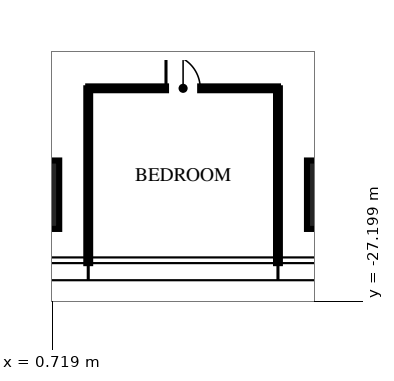
"""IFC4 building model, lengths in metres.
Left out: names, types, materials, properties, quantities, classifications, styles, units other than length and angle.
Written with IfcOpenShell. Run it as: python <this file> out.ifc"""

import sys

from ifc_helpers import new_model, si_unit, direction, frame, frame_2d, origin, origin_2d, place, context, subcontext, project, spatial, rectangle, extrude, element, fill, save


model = new_model("IFC4")
c1 = context("Model", 3, precision=1e-05, world=origin(), true_north=direction((0.0, 1.0)))
c2 = subcontext(c1, "Body", "Model", "MODEL_VIEW")
j1 = project(units=[si_unit("LENGTHUNIT", "METRE"), si_unit("PLANEANGLEUNIT", "RADIAN")], contexts=[c1])
p1 = place(None, origin())
s1 = spatial("IfcSite", under=j1, at=p1, CompositionType="ELEMENT")
p2 = place(p1, origin())
s2 = spatial("IfcBuilding", under=s1, at=p2, CompositionType="ELEMENT")
p3 = place(p2, frame((0.0, 0.0, 222.0)))
s3 = spatial("IfcBuildingStorey", under=s2, at=p3, CompositionType="ELEMENT", Elevation=222.0)
for number, where, z_axis, x_axis in (
    (1, (8.32, -24.4, 0.0), (0.0, 0.0, 1.0), (1.0, 0.0, 0.0)),
    (2, (0.0, -24.4, 0.0), (0.0, 0.0, 1.0), (1.0, 0.0, 0.0)),
):
    element("IfcColumn", number, at=place(p3, frame(where, z_axis=z_axis, x_axis=x_axis)), inside=s3, PredefinedType="COLUMN", context=c2, shape_type="SweptSolid", body=[
        extrude(rectangle(XDim=1.8, YDim=1.8, at=origin_2d()), origin(), (0.0, 0.0, 1.0), 3.75),
    ])
for number, where, z_axis, x_axis in (
    (3, (1.664, -21.6, 0.0), (0.0, 0.0, 1.0), (0.0, -1.0, 0.0)),
    (4, (6.656, -21.6, 0.0), (0.0, 0.0, 1.0), (0.0, -1.0, 0.0)),
):
    element("IfcWall", number, at=place(p3, frame(where, z_axis=z_axis, x_axis=x_axis)), inside=s3, PredefinedType="PARTITIONING", context=c2, shape_type="SweptSolid", body=[
        extrude(rectangle(XDim=4.6, YDim=0.1, at=frame_2d((2.3, 0.0))), origin(), (0.0, 0.0, 1.0), 2.91),
    ])
p4 = place(p3, frame((1.664, -21.6, 0.0), z_axis=(0.0, 0.0, 1.0), x_axis=(1.0, 0.0, 0.0)))
e5 = element("IfcWall", 5, at=p4, inside=s3, PredefinedType="PARTITIONING", context=c2, shape_type="SweptSolid", body=[
    extrude(rectangle(XDim=4.992, YDim=0.1, at=frame_2d((2.496, 0.0))), origin(), (0.0, 0.0, 1.0), 2.81),
])
p5 = place(p4, frame((2.046, 0.0, 0.0)))
e6 = element("IfcOpeningElement", 6, at=p5, cuts=e5, PredefinedType="OPENING", context=c2, shape_type="SweptSolid", body=[
    extrude(rectangle(XDim=0.9, YDim=2.1, at=frame_2d((0.45, 1.05))), frame((0.0, 0.06, 0.0), z_axis=(0.0, -1.0, 0.0), x_axis=(1.0, 0.0, 0.0)), (0.0, 0.0, 1.0), 0.12),
])
p6 = place(p5, origin())
e7 = element("IfcDoor", 7, at=p6, inside=s3, OperationType="SINGLE_SWING_LEFT", PredefinedType="DOOR", context=c2, shape_type="SweptSolid", body=[
    extrude(rectangle(XDim=0.9, YDim=2.1, at=frame_2d((0.45, 1.05))), frame((0.0, 0.025, 0.0), z_axis=(0.0, -1.0, 0.0), x_axis=(1.0, 0.0, 0.0)), (0.0, 0.0, 1.0), 0.05),
])
fill(e6, e7)
save(model, sys.argv[1])
